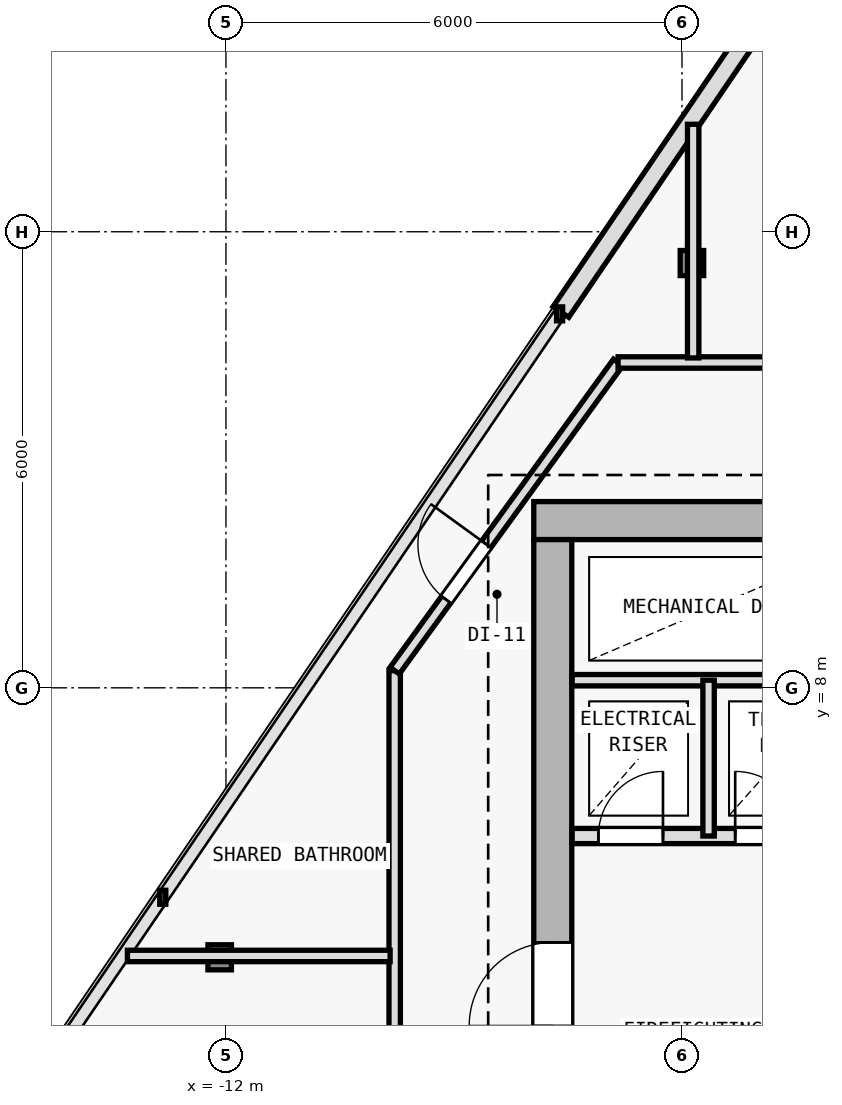
"""IFC4 building model, lengths in metres.
Left out: names, types, materials, properties, quantities, classifications, styles, units other than length and angle.
Written with IfcOpenShell. Run it as: python <this file> out.ifc"""

import sys

from ifc_helpers import new_model, si_unit, direction, frame, frame_2d, origin, origin_2d, place, context, subcontext, project, spatial, rectangle, i_section, extrude, element, fill, save


model = new_model("IFC4")
c1 = context("Model", 3, precision=1e-05, world=origin(), true_north=direction((0.0, 1.0)))
c2 = subcontext(c1, "Body", "Model", "MODEL_VIEW")
j1 = project(units=[si_unit("LENGTHUNIT", "METRE"), si_unit("PLANEANGLEUNIT", "RADIAN")], contexts=[c1])
p1 = place(None, origin())
s1 = spatial("IfcSite", under=j1, at=p1, CompositionType="ELEMENT")
p2 = place(p1, origin())
s2 = spatial("IfcBuilding", under=s1, at=p2, CompositionType="ELEMENT")
p3 = place(p2, frame((0.0, 0.0, 276.0)))
s3 = spatial("IfcBuildingStorey", under=s2, at=p3, CompositionType="ELEMENT", Elevation=276.0)
p4 = place(p3, frame((-7.7, 10.2, 0.0), z_axis=(0.0, 0.0, 1.0), x_axis=(1.0, 0.0, 0.0)))
e1 = element("IfcColumn", 1, at=p4, inside=s3, PredefinedType="COLUMN", context=c2, shape_type="SweptSolid", body=[
    extrude(i_section(OverallWidth=0.374, OverallDepth=0.372, WebThickness=0.012, FlangeThickness=0.02, FilletRadius=0.015, at=origin_2d()), origin(), (0.0, 0.0, 1.0), 3.6),
])
p5 = place(p3, frame((-5.869, 13.588, 0.006), z_axis=(0.009047218528, -0.002584919579, 0.999955732034), x_axis=(0.274721127897, 0.961523947641, 0.0)))
e2 = element("IfcColumn", 2, at=p5, inside=s3, PredefinedType="COLUMN", context=c2, shape_type="SweptSolid", body=[
    extrude(i_section(OverallWidth=0.309, OverallDepth=0.33, WebThickness=0.011, FlangeThickness=0.019, FilletRadius=0.027, at=origin_2d()), origin(), (0.0, 0.0, 1.0), 3.589),
])
p6 = place(p3, frame((-12.083, 4.455, 0.006), z_axis=(0.017479483538, 0.009793951865, 0.999799252931), x_axis=(-0.488810085697, 0.87239022239, 0.0)))
e3 = element("IfcColumn", 3, at=p6, inside=s3, PredefinedType="COLUMN", context=c2, shape_type="SweptSolid", body=[
    extrude(i_section(OverallWidth=0.309, OverallDepth=0.33, WebThickness=0.011, FlangeThickness=0.019, FilletRadius=0.027, at=origin_2d()), origin(), (0.0, 0.0, 1.0), 3.59),
])
p7 = place(p3, frame((-7.593, 12.945, 0.0), z_axis=(0.0, 0.0, 1.0), x_axis=(0.562476003565, 0.826813609838, 0.0)))
e4 = element("IfcWall", 4, at=p7, inside=s3, PredefinedType="SOLIDWALL", context=c2, shape_type="SweptSolid", body=[
    extrude(rectangle(XDim=9.816, YDim=0.25, at=frame_2d((4.908, 0.0))), origin(), (0.0, 0.0, 1.0), 3.35),
])
p8 = place(p7, frame((4.308, 0.0, 0.62)))
e5 = element("IfcOpeningElement", 5, at=p8, cuts=e4, PredefinedType="OPENING", context=c2, shape_type="SweptSolid", body=[
    extrude(rectangle(XDim=1.2, YDim=1.8, at=frame_2d((0.6, 0.9))), frame((0.0, 0.135, 0.0), z_axis=(0.0, -1.0, 0.0), x_axis=(1.0, 0.0, 0.0)), (0.0, 0.0, 1.0), 0.27),
])
p9 = place(p3, frame((7.95, 10.2, 0.0), z_axis=(0.0, 0.0, 1.0), x_axis=(-1.0, 0.0, 0.0)))
e6 = element("IfcWall", 6, at=p9, inside=s3, PredefinedType="SHEAR", context=c2, shape_type="SweptSolid", body=[
    extrude(rectangle(XDim=15.9, YDim=0.5, at=frame_2d((7.95, 0.0))), origin(), (0.0, 0.0, 1.0), 3.35),
])
p10 = place(p9, frame((4.4, 0.0, 0.0)))
e7 = element("IfcOpeningElement", 7, at=p10, cuts=e6, PredefinedType="OPENING", context=c2, shape_type="SweptSolid", body=[
    extrude(rectangle(XDim=1.1, YDim=2.15, at=frame_2d((0.55, 1.075))), frame((0.0, 0.26, 0.0), z_axis=(0.0, -1.0, 0.0), x_axis=(1.0, 0.0, 0.0)), (0.0, 0.0, 1.0), 0.52),
])
p11 = place(p3, frame((-7.7, -9.15, 0.0), z_axis=(0.0, 0.0, 1.0), x_axis=(0.0, 1.0, 0.0)))
e8 = element("IfcWall", 8, at=p11, inside=s3, PredefinedType="SHEAR", context=c2, shape_type="SweptSolid", body=[
    extrude(rectangle(XDim=19.1, YDim=0.5, at=frame_2d((9.55, 0.0))), origin(), (0.0, 0.0, 1.0), 3.35),
])
p12 = place(p11, frame((12.7, 0.0, 0.0)))
e9 = element("IfcOpeningElement", 9, at=p12, cuts=e8, PredefinedType="OPENING", context=c2, shape_type="SweptSolid", body=[
    extrude(rectangle(XDim=1.1, YDim=2.15, at=frame_2d((0.55, 1.075))), frame((0.0, 0.26, 0.0), z_axis=(0.0, -1.0, 0.0), x_axis=(1.0, 0.0, 0.0)), (0.0, 0.0, 1.0), 0.52),
])
p13 = place(p3, frame((-7.445, 6.05, 0.0), z_axis=(0.0, 0.0, 1.0), x_axis=(1.0, 0.0, 0.0)))
e10 = element("IfcWall", 10, at=p13, inside=s3, PredefinedType="SOLIDWALL", context=c2, shape_type="SweptSolid", body=[
    extrude(rectangle(XDim=3.595, YDim=0.2, at=frame_2d((1.797, 0.0))), origin(), (0.0, 0.0, 1.0), 3.35),
])
p14 = place(p13, frame((0.345, 0.0, 0.0)))
e11 = element("IfcOpeningElement", 11, at=p14, cuts=e10, PredefinedType="OPENING", context=c2, shape_type="SweptSolid", body=[
    extrude(rectangle(XDim=0.85, YDim=2.1, at=frame_2d((0.425, 1.05))), frame((0.0, 0.11, 0.0), z_axis=(0.0, -1.0, 0.0), x_axis=(1.0, 0.0, 0.0)), (0.0, 0.0, 1.0), 0.22),
])
p15 = place(p13, frame((2.145, 0.0, 0.0)))
e12 = element("IfcOpeningElement", 12, at=p15, cuts=e10, PredefinedType="OPENING", context=c2, shape_type="SweptSolid", body=[
    extrude(rectangle(XDim=0.85, YDim=2.1, at=frame_2d((0.425, 1.05))), frame((0.0, 0.11, 0.0), z_axis=(0.0, -1.0, 0.0), x_axis=(1.0, 0.0, 0.0)), (0.0, 0.0, 1.0), 0.22),
])
p16 = place(p3, frame((-7.445, 8.1, 0.0), z_axis=(0.0, 0.0, 1.0), x_axis=(1.0, 0.0, 0.0)))
e13 = element("IfcWall", 13, at=p16, inside=s3, PredefinedType="PARTITIONING", context=c2, shape_type="SweptSolid", body=[
    extrude(rectangle(XDim=3.595, YDim=0.15, at=frame_2d((1.797, 0.0))), origin(), (0.0, 0.0, 1.0), 3.35),
])
p17 = place(p3, frame((-5.65, 6.05, 0.0), z_axis=(0.0, 0.0, 1.0), x_axis=(0.0, 1.0, 0.0)))
e14 = element("IfcWall", 14, at=p17, inside=s3, PredefinedType="PARTITIONING", context=c2, shape_type="SweptSolid", body=[
    extrude(rectangle(XDim=2.05, YDim=0.15, at=frame_2d((1.025, 0.0))), origin(), (0.0, 0.0, 1.0), 3.35),
])
p18 = place(p3, frame((-9.78, -11.48, 0.0), z_axis=(0.0, 0.0, 1.0), x_axis=(0.0, 1.0, 0.0)))
e15 = element("IfcWall", 15, at=p18, inside=s3, PredefinedType="PARTITIONING", context=c2, shape_type="SweptSolid", body=[
    extrude(rectangle(XDim=19.706, YDim=0.15, at=frame_2d((9.853, 0.0))), origin(), (0.0, 0.0, 1.0), 2.775),
])
p19 = place(p18, frame((11.781, 0.0, 0.0)))
e16 = element("IfcOpeningElement", 16, at=p19, cuts=e15, PredefinedType="OPENING", context=c2, shape_type="SweptSolid", body=[
    extrude(rectangle(XDim=0.9, YDim=2.1, at=frame_2d((0.45, 1.05))), frame((0.0, 0.085, 0.0), z_axis=(0.0, -1.0, 0.0), x_axis=(1.0, 0.0, 0.0)), (0.0, 0.0, 1.0), 0.17),
])
p20 = place(p18, frame((3.894, 0.0, 0.0)))
e17 = element("IfcOpeningElement", 17, at=p20, cuts=e15, PredefinedType="OPENING", context=c2, shape_type="SweptSolid", body=[
    extrude(rectangle(XDim=0.9, YDim=2.1, at=frame_2d((0.45, 1.05))), frame((0.0, 0.085, 0.0), z_axis=(0.0, -1.0, 0.0), x_axis=(1.0, 0.0, 0.0)), (0.0, 0.0, 1.0), 0.17),
])
p21 = place(p3, frame((-9.78, 8.226, 0.0), z_axis=(0.0, 0.0, 1.0), x_axis=(0.586956386413, 0.809618552436, 0.0)))
e18 = element("IfcWall", 18, at=p21, inside=s3, PredefinedType="PARTITIONING", context=c2, shape_type="SweptSolid", body=[
    extrude(rectangle(XDim=5.008, YDim=0.15, at=frame_2d((2.504, 0.0))), origin(), (0.0, 0.0, 1.0), 3.015),
])
p22 = place(p21, frame((1.154, 0.0, 0.0)))
e19 = element("IfcOpeningElement", 19, at=p22, cuts=e18, PredefinedType="OPENING", context=c2, shape_type="SweptSolid", body=[
    extrude(rectangle(XDim=0.9, YDim=2.1, at=frame_2d((0.45, 1.05))), frame((0.0, 0.085, 0.0), z_axis=(0.0, -1.0, 0.0), x_axis=(1.0, 0.0, 0.0)), (0.0, 0.0, 1.0), 0.17),
])
p23 = place(p3, frame((-6.841, 12.28, 0.0), z_axis=(0.0, 0.0, 1.0), x_axis=(1.0, 0.0, 0.0)))
e20 = element("IfcWall", 20, at=p23, inside=s3, PredefinedType="PARTITIONING", context=c2, shape_type="SweptSolid", body=[
    extrude(rectangle(XDim=13.682, YDim=0.15, at=frame_2d((6.841, 0.0))), origin(), (0.0, 0.0, 1.0), 3.015),
])
p24 = place(p23, frame((10.934, 0.0, 0.0)))
e21 = element("IfcOpeningElement", 21, at=p24, cuts=e20, PredefinedType="OPENING", context=c2, shape_type="SweptSolid", body=[
    extrude(rectangle(XDim=0.9, YDim=2.1, at=frame_2d((0.45, 1.05))), frame((0.0, 0.085, 0.0), z_axis=(0.0, -1.0, 0.0), x_axis=(1.0, 0.0, 0.0)), (0.0, 0.0, 1.0), 0.17),
])
p25 = place(p23, frame((4.677, 0.0, 0.0)))
e22 = element("IfcOpeningElement", 22, at=p25, cuts=e20, PredefinedType="OPENING", context=c2, shape_type="SweptSolid", body=[
    extrude(rectangle(XDim=0.9, YDim=2.1, at=frame_2d((0.45, 1.05))), frame((0.0, 0.085, 0.0), z_axis=(0.0, -1.0, 0.0), x_axis=(1.0, 0.0, 0.0)), (0.0, 0.0, 1.0), 0.17),
])
p26 = place(p3, frame((-5.853, 12.34, 0.0), z_axis=(0.0, 0.0, 1.0), x_axis=(0.0, 1.0, 0.0)))
e23 = element("IfcWall", 23, at=p26, inside=s3, PredefinedType="PARTITIONING", context=c2, shape_type="SweptSolid", body=[
    extrude(rectangle(XDim=3.074, YDim=0.15, at=frame_2d((1.537, 0.0))), origin(), (0.0, 0.0, 1.0), 3.015),
])
p27 = place(p3, frame((-9.84, 4.472, 0.0), z_axis=(0.0, 0.0, 1.0), x_axis=(-1.0, 0.0, 0.0)))
e24 = element("IfcWall", 24, at=p27, inside=s3, PredefinedType="PARTITIONING", context=c2, shape_type="SweptSolid", body=[
    extrude(rectangle(XDim=3.456, YDim=0.15, at=frame_2d((1.728, 0.0))), origin(), (0.0, 0.0, 1.0), 3.015),
])
p28 = place(p12, origin())
e25 = element("IfcDoor", 25, at=p28, inside=s3, OperationType="SINGLE_SWING_LEFT", PredefinedType="DOOR", context=c2, shape_type="SweptSolid", body=[
    extrude(rectangle(XDim=1.1, YDim=2.15, at=frame_2d((0.55, 1.075))), frame((0.0, 0.025, 0.0), z_axis=(0.0, -1.0, 0.0), x_axis=(1.0, 0.0, 0.0)), (0.0, 0.0, 1.0), 0.05),
])
fill(e9, e25)
p29 = place(p14, origin())
e26 = element("IfcDoor", 26, at=p29, inside=s3, OperationType="SINGLE_SWING_RIGHT", PredefinedType="DOOR", context=c2, shape_type="SweptSolid", body=[
    extrude(rectangle(XDim=0.85, YDim=2.1, at=frame_2d((0.425, 1.05))), frame((0.0, 0.025, 0.0), z_axis=(0.0, -1.0, 0.0), x_axis=(1.0, 0.0, 0.0)), (0.0, 0.0, 1.0), 0.05),
])
fill(e11, e26)
p30 = place(p15, origin())
e27 = element("IfcDoor", 27, at=p30, inside=s3, OperationType="SINGLE_SWING_LEFT", PredefinedType="DOOR", context=c2, shape_type="SweptSolid", body=[
    extrude(rectangle(XDim=0.85, YDim=2.1, at=frame_2d((0.425, 1.05))), frame((0.0, 0.025, 0.0), z_axis=(0.0, -1.0, 0.0), x_axis=(1.0, 0.0, 0.0)), (0.0, 0.0, 1.0), 0.05),
])
fill(e12, e27)
p31 = place(p22, origin())
e28 = element("IfcDoor", 28, at=p31, inside=s3, OperationType="SINGLE_SWING_RIGHT", PredefinedType="DOOR", context=c2, shape_type="SweptSolid", body=[
    extrude(rectangle(XDim=0.9, YDim=2.1, at=frame_2d((0.45, 1.05))), frame((0.0, 0.025, 0.0), z_axis=(0.0, -1.0, 0.0), x_axis=(1.0, 0.0, 0.0)), (0.0, 0.0, 1.0), 0.05),
])
fill(e19, e28)
save(model, sys.argv[1])
